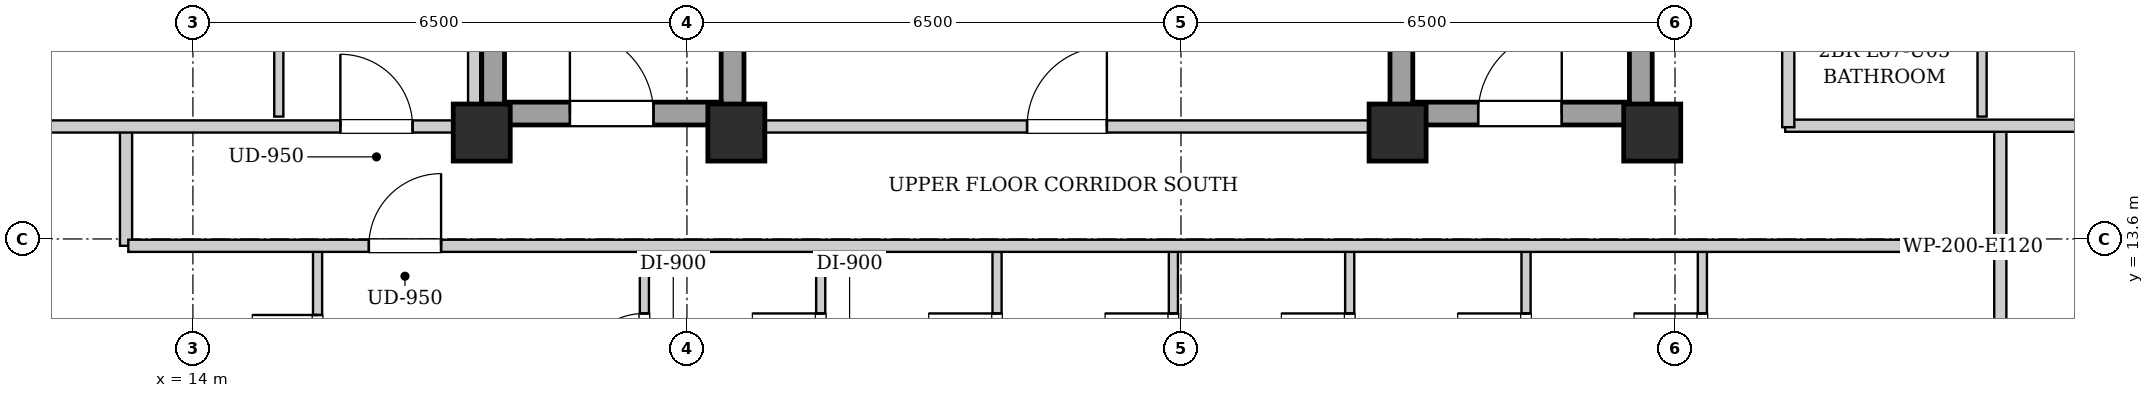
"""IFC4 building model, lengths in metres.
Left out: names, types, materials, properties, quantities, classifications, styles, units other than length and angle.
Written with IfcOpenShell. Run it as: python <this file> out.ifc"""

import sys

from ifc_helpers import new_model, si_unit, direction, frame, frame_2d, origin, origin_2d, place, context, subcontext, project, spatial, rectangle, extrude, element, fill, save


model = new_model("IFC4")
c1 = context("Model", 3, precision=1e-05, world=origin(), true_north=direction((0.0, 1.0)))
c2 = subcontext(c1, "Body", "Model", "MODEL_VIEW")
j1 = project(units=[si_unit("LENGTHUNIT", "METRE"), si_unit("PLANEANGLEUNIT", "RADIAN")], contexts=[c1])
p1 = place(None, origin())
s1 = spatial("IfcSite", under=j1, at=p1, CompositionType="ELEMENT")
p2 = place(p1, origin())
s2 = spatial("IfcBuilding", under=s1, at=p2, CompositionType="ELEMENT")
p3 = place(p2, frame((0.0, 0.0, 230.9)))
s3 = spatial("IfcBuildingStorey", under=s2, at=p3, CompositionType="ELEMENT", Elevation=230.9)
for number, where, z_axis, x_axis in (
    (1, (17.8, 15.0, 0.0), (0.0, 0.0, 1.0), (1.0, 0.0, 0.0)),
    (2, (21.15, 15.0, 0.0), (0.0, 0.0, 1.0), (1.0, 0.0, 0.0)),
    (3, (29.85, 15.0, 0.0), (0.0, 0.0, 1.0), (1.0, 0.0, 0.0)),
    (4, (33.2, 15.0, 0.0), (0.0, 0.0, 1.0), (1.0, 0.0, 0.0)),
):
    element("IfcColumn", number, at=place(p3, frame(where, z_axis=z_axis, x_axis=x_axis)), inside=s3, PredefinedType="COLUMN", context=c2, shape_type="SweptSolid", body=[
        extrude(rectangle(XDim=0.75, YDim=0.75, at=origin_2d()), origin(), (0.0, 0.0, 1.0), 3.4),
    ])
for number, where, z_axis, x_axis in (
    (5, (17.95, 15.1, 0.0), (0.0, 0.0, 1.0), (0.0, 1.0, 0.0)),
    (6, (21.1, 15.1, 0.0), (0.0, 0.0, 1.0), (0.0, 1.0, 0.0)),
):
    element("IfcWall", number, at=place(p3, frame(where, z_axis=z_axis, x_axis=x_axis)), inside=s3, PredefinedType="SHEAR", context=c2, shape_type="SweptSolid", body=[
        extrude(rectangle(XDim=9.0, YDim=0.3, at=frame_2d((4.5, 0.0))), origin(), (0.0, 0.0, 1.0), 3.14),
    ])
p4 = place(p3, frame((18.1, 15.25, 0.0), z_axis=(0.0, 0.0, 1.0), x_axis=(1.0, 0.0, 0.0)))
e7 = element("IfcWall", 7, at=p4, inside=s3, PredefinedType="SHEAR", context=c2, shape_type="SweptSolid", body=[
    extrude(rectangle(XDim=2.85, YDim=0.3, at=frame_2d((1.425, 0.0))), origin(), (0.0, 0.0, 1.0), 3.14),
])
p5 = place(p4, frame((0.86, 0.0, 0.0)))
e8 = element("IfcOpeningElement", 8, at=p5, cuts=e7, PredefinedType="OPENING", context=c2, shape_type="SweptSolid", body=[
    extrude(rectangle(XDim=1.1, YDim=2.05, at=frame_2d((0.55, 1.025))), frame((0.0, 0.16, 0.0), z_axis=(0.0, -1.0, 0.0), x_axis=(1.0, 0.0, 0.0)), (0.0, 0.0, 1.0), 0.32),
])
for number, where, z_axis, x_axis in (
    (9, (29.9, 15.1, 0.0), (0.0, 0.0, 1.0), (0.0, 1.0, 0.0)),
    (10, (33.05, 15.1, 0.0), (0.0, 0.0, 1.0), (0.0, 1.0, 0.0)),
):
    element("IfcWall", number, at=place(p3, frame(where, z_axis=z_axis, x_axis=x_axis)), inside=s3, PredefinedType="SHEAR", context=c2, shape_type="SweptSolid", body=[
        extrude(rectangle(XDim=9.0, YDim=0.3, at=frame_2d((4.5, 0.0))), origin(), (0.0, 0.0, 1.0), 3.14),
    ])
p6 = place(p3, frame((30.05, 15.25, 0.0), z_axis=(0.0, 0.0, 1.0), x_axis=(1.0, 0.0, 0.0)))
e11 = element("IfcWall", 11, at=p6, inside=s3, PredefinedType="SHEAR", context=c2, shape_type="SweptSolid", body=[
    extrude(rectangle(XDim=2.85, YDim=0.3, at=frame_2d((1.425, 0.0))), origin(), (0.0, 0.0, 1.0), 3.14),
])
p7 = place(p6, frame((0.86, 0.0, 0.0)))
e12 = element("IfcOpeningElement", 12, at=p7, cuts=e11, PredefinedType="OPENING", context=c2, shape_type="SweptSolid", body=[
    extrude(rectangle(XDim=1.1, YDim=2.05, at=frame_2d((0.55, 1.025))), frame((0.0, 0.16, 0.0), z_axis=(0.0, -1.0, 0.0), x_axis=(1.0, 0.0, 0.0)), (0.0, 0.0, 1.0), 0.32),
])
p8 = place(p3, frame((21.25, 15.08, 0.0), z_axis=(0.0, 0.0, 1.0), x_axis=(1.0, 0.0, 0.0)))
e13 = element("IfcWall", 13, at=p8, inside=s3, PredefinedType="PARTITIONING", context=c2, shape_type="SweptSolid", body=[
    extrude(rectangle(XDim=8.5, YDim=0.16, at=frame_2d((4.25, 0.0))), origin(), (0.0, 0.0, 1.0), 2.668),
])
p9 = place(p8, frame((3.725, 0.0, 0.0)))
e14 = element("IfcOpeningElement", 14, at=p9, cuts=e13, PredefinedType="OPENING", context=c2, shape_type="SweptSolid", body=[
    extrude(rectangle(XDim=1.05, YDim=2.05, at=frame_2d((0.525, 1.025))), frame((0.0, 0.09, 0.0), z_axis=(0.0, -1.0, 0.0), x_axis=(1.0, 0.0, 0.0)), (0.0, 0.0, 1.0), 0.18),
])
for number, where, z_axis, x_axis in (
    (15, (13.12, 13.51, 0.0), (0.0, 0.0, 1.0), (0.0, 1.0, 0.0)),
    (16, (37.78, 13.51, 0.0), (0.0, 0.0, 1.0), (0.0, 1.0, 0.0)),
):
    element("IfcWall", number, at=place(p3, frame(where, z_axis=z_axis, x_axis=x_axis)), inside=s3, PredefinedType="PARTITIONING", context=c2, shape_type="SweptSolid", body=[
        extrude(rectangle(XDim=1.58, YDim=0.16, at=frame_2d((0.79, 0.0))), origin(), (0.0, 0.0, 1.0), 3.14),
    ])
p10 = place(p3, frame((34.95, 15.09, 0.0), z_axis=(0.0, 0.0, 1.0), x_axis=(1.0, 0.0, 0.0)))
e17 = element("IfcWall", 17, at=p10, inside=s3, PredefinedType="PARTITIONING", context=c2, shape_type="SweptSolid", body=[
    extrude(rectangle(XDim=5.07, YDim=0.16, at=frame_2d((2.535, 0.0))), origin(), (0.0, 0.0, 1.0), 2.668),
])
p11 = place(p3, frame((37.78, 10.81, 0.0), z_axis=(0.0, 0.0, 1.0), x_axis=(0.0, 1.0, 0.0)))
e18 = element("IfcWall", 18, at=p11, inside=s3, PredefinedType="PARTITIONING", context=c2, shape_type="SweptSolid", body=[
    extrude(rectangle(XDim=2.66, YDim=0.16, at=frame_2d((1.33, 0.0))), origin(), (0.0, 0.0, 1.0), 3.14),
])
p12 = place(p3, frame((15.64, 10.87, 0.0), z_axis=(0.0, 0.0, 1.0), x_axis=(0.0, 1.0, 0.0)))
e19 = element("IfcWall", 19, at=p12, inside=s3, PredefinedType="PARTITIONING", context=c2, shape_type="SweptSolid", body=[
    extrude(rectangle(XDim=2.6, YDim=0.12, at=frame_2d((1.3, 0.0))), origin(), (0.0, 0.0, 1.0), 3.14),
])
p13 = place(p12, frame((0.87, 0.0, 0.0)))
e20 = element("IfcOpeningElement", 20, at=p13, cuts=e19, PredefinedType="OPENING", context=c2, shape_type="SweptSolid", body=[
    extrude(rectangle(XDim=0.86, YDim=2.05, at=frame_2d((0.43, 1.025))), frame((0.0, 0.07, 0.0), z_axis=(0.0, -1.0, 0.0), x_axis=(1.0, 0.0, 0.0)), (0.0, 0.0, 1.0), 0.14),
])
p14 = place(p3, frame((19.94, 10.87, 0.0), z_axis=(0.0, 0.0, 1.0), x_axis=(0.0, 1.0, 0.0)))
e21 = element("IfcWall", 21, at=p14, inside=s3, PredefinedType="PARTITIONING", context=c2, shape_type="SweptSolid", body=[
    extrude(rectangle(XDim=2.6, YDim=0.12, at=frame_2d((1.3, 0.0))), origin(), (0.0, 0.0, 1.0), 3.14),
])
p15 = place(p14, frame((0.85, 0.0, 0.0)))
e22 = element("IfcOpeningElement", 22, at=p15, cuts=e21, PredefinedType="OPENING", context=c2, shape_type="SweptSolid", body=[
    extrude(rectangle(XDim=0.9, YDim=2.05, at=frame_2d((0.45, 1.025))), frame((0.0, 0.07, 0.0), z_axis=(0.0, -1.0, 0.0), x_axis=(1.0, 0.0, 0.0)), (0.0, 0.0, 1.0), 0.14),
])
p16 = place(p3, frame((22.26, 10.87, 0.0), z_axis=(0.0, 0.0, 1.0), x_axis=(0.0, 1.0, 0.0)))
e23 = element("IfcWall", 23, at=p16, inside=s3, PredefinedType="PARTITIONING", context=c2, shape_type="SweptSolid", body=[
    extrude(rectangle(XDim=2.6, YDim=0.12, at=frame_2d((1.3, 0.0))), origin(), (0.0, 0.0, 1.0), 3.14),
])
p17 = place(p16, frame((0.85, 0.0, 0.0)))
e24 = element("IfcOpeningElement", 24, at=p17, cuts=e23, PredefinedType="OPENING", context=c2, shape_type="SweptSolid", body=[
    extrude(rectangle(XDim=0.9, YDim=2.05, at=frame_2d((0.45, 1.025))), frame((0.0, 0.07, 0.0), z_axis=(0.0, -1.0, 0.0), x_axis=(1.0, 0.0, 0.0)), (0.0, 0.0, 1.0), 0.14),
])
p18 = place(p3, frame((24.58, 10.87, 0.0), z_axis=(0.0, 0.0, 1.0), x_axis=(0.0, 1.0, 0.0)))
e25 = element("IfcWall", 25, at=p18, inside=s3, PredefinedType="PARTITIONING", context=c2, shape_type="SweptSolid", body=[
    extrude(rectangle(XDim=2.6, YDim=0.12, at=frame_2d((1.3, 0.0))), origin(), (0.0, 0.0, 1.0), 3.14),
])
p19 = place(p18, frame((0.85, 0.0, 0.0)))
e26 = element("IfcOpeningElement", 26, at=p19, cuts=e25, PredefinedType="OPENING", context=c2, shape_type="SweptSolid", body=[
    extrude(rectangle(XDim=0.9, YDim=2.05, at=frame_2d((0.45, 1.025))), frame((0.0, 0.07, 0.0), z_axis=(0.0, -1.0, 0.0), x_axis=(1.0, 0.0, 0.0)), (0.0, 0.0, 1.0), 0.14),
])
p20 = place(p3, frame((26.9, 10.87, 0.0), z_axis=(0.0, 0.0, 1.0), x_axis=(0.0, 1.0, 0.0)))
e27 = element("IfcWall", 27, at=p20, inside=s3, PredefinedType="PARTITIONING", context=c2, shape_type="SweptSolid", body=[
    extrude(rectangle(XDim=2.6, YDim=0.12, at=frame_2d((1.3, 0.0))), origin(), (0.0, 0.0, 1.0), 3.14),
])
p21 = place(p20, frame((0.85, 0.0, 0.0)))
e28 = element("IfcOpeningElement", 28, at=p21, cuts=e27, PredefinedType="OPENING", context=c2, shape_type="SweptSolid", body=[
    extrude(rectangle(XDim=0.9, YDim=2.05, at=frame_2d((0.45, 1.025))), frame((0.0, 0.07, 0.0), z_axis=(0.0, -1.0, 0.0), x_axis=(1.0, 0.0, 0.0)), (0.0, 0.0, 1.0), 0.14),
])
p22 = place(p3, frame((29.22, 10.87, 0.0), z_axis=(0.0, 0.0, 1.0), x_axis=(0.0, 1.0, 0.0)))
e29 = element("IfcWall", 29, at=p22, inside=s3, PredefinedType="PARTITIONING", context=c2, shape_type="SweptSolid", body=[
    extrude(rectangle(XDim=2.6, YDim=0.12, at=frame_2d((1.3, 0.0))), origin(), (0.0, 0.0, 1.0), 3.14),
])
p23 = place(p22, frame((0.85, 0.0, 0.0)))
e30 = element("IfcOpeningElement", 30, at=p23, cuts=e29, PredefinedType="OPENING", context=c2, shape_type="SweptSolid", body=[
    extrude(rectangle(XDim=0.9, YDim=2.05, at=frame_2d((0.45, 1.025))), frame((0.0, 0.07, 0.0), z_axis=(0.0, -1.0, 0.0), x_axis=(1.0, 0.0, 0.0)), (0.0, 0.0, 1.0), 0.14),
])
p24 = place(p3, frame((31.54, 10.87, 0.0), z_axis=(0.0, 0.0, 1.0), x_axis=(0.0, 1.0, 0.0)))
e31 = element("IfcWall", 31, at=p24, inside=s3, PredefinedType="PARTITIONING", context=c2, shape_type="SweptSolid", body=[
    extrude(rectangle(XDim=2.6, YDim=0.12, at=frame_2d((1.3, 0.0))), origin(), (0.0, 0.0, 1.0), 3.14),
])
p25 = place(p24, frame((0.85, 0.0, 0.0)))
e32 = element("IfcOpeningElement", 32, at=p25, cuts=e31, PredefinedType="OPENING", context=c2, shape_type="SweptSolid", body=[
    extrude(rectangle(XDim=0.9, YDim=2.05, at=frame_2d((0.45, 1.025))), frame((0.0, 0.07, 0.0), z_axis=(0.0, -1.0, 0.0), x_axis=(1.0, 0.0, 0.0)), (0.0, 0.0, 1.0), 0.14),
])
p26 = place(p3, frame((33.86, 10.87, 0.0), z_axis=(0.0, 0.0, 1.0), x_axis=(0.0, 1.0, 0.0)))
e33 = element("IfcWall", 33, at=p26, inside=s3, PredefinedType="PARTITIONING", context=c2, shape_type="SweptSolid", body=[
    extrude(rectangle(XDim=2.6, YDim=0.12, at=frame_2d((1.3, 0.0))), origin(), (0.0, 0.0, 1.0), 3.14),
])
p27 = place(p26, frame((0.85, 0.0, 0.0)))
e34 = element("IfcOpeningElement", 34, at=p27, cuts=e33, PredefinedType="OPENING", context=c2, shape_type="SweptSolid", body=[
    extrude(rectangle(XDim=0.9, YDim=2.05, at=frame_2d((0.45, 1.025))), frame((0.0, 0.07, 0.0), z_axis=(0.0, -1.0, 0.0), x_axis=(1.0, 0.0, 0.0)), (0.0, 0.0, 1.0), 0.14),
])
p28 = place(p3, frame((10.88, 15.08, 0.0), z_axis=(0.0, 0.0, 1.0), x_axis=(1.0, 0.0, 0.0)))
e35 = element("IfcWall", 35, at=p28, inside=s3, PredefinedType="PARTITIONING", context=c2, shape_type="SweptSolid", body=[
    extrude(rectangle(XDim=6.88, YDim=0.16, at=frame_2d((3.44, 0.0))), origin(), (0.0, 0.0, 1.0), 2.668),
])
p29 = place(p28, frame((5.06, 0.0, 0.0)))
e36 = element("IfcOpeningElement", 36, at=p29, cuts=e35, PredefinedType="OPENING", context=c2, shape_type="SweptSolid", body=[
    extrude(rectangle(XDim=0.95, YDim=2.1, at=frame_2d((0.475, 1.05))), frame((0.0, 0.09, 0.0), z_axis=(0.0, -1.0, 0.0), x_axis=(1.0, 0.0, 0.0)), (0.0, 0.0, 1.0), 0.18),
])
p30 = place(p3, frame((15.13, 15.21, 0.0), z_axis=(0.0, 0.0, 1.0), x_axis=(0.0, 1.0, 0.0)))
e37 = element("IfcWall", 37, at=p30, inside=s3, PredefinedType="PARTITIONING", context=c2, shape_type="SweptSolid", body=[
    extrude(rectangle(XDim=4.308, YDim=0.12, at=frame_2d((2.154, 0.0))), origin(), (0.0, 0.0, 1.0), 3.14),
])
p31 = place(p30, frame((1.704, 0.0, 0.0)))
e38 = element("IfcOpeningElement", 38, at=p31, cuts=e37, PredefinedType="OPENING", context=c2, shape_type="SweptSolid", body=[
    extrude(rectangle(XDim=0.9, YDim=2.05, at=frame_2d((0.45, 1.025))), frame((0.0, 0.07, 0.0), z_axis=(0.0, -1.0, 0.0), x_axis=(1.0, 0.0, 0.0)), (0.0, 0.0, 1.0), 0.14),
])
p32 = place(p3, frame((37.54, 15.21, 0.0), z_axis=(0.0, 0.0, 1.0), x_axis=(0.0, 1.0, 0.0)))
e39 = element("IfcWall", 39, at=p32, inside=s3, PredefinedType="PARTITIONING", context=c2, shape_type="SweptSolid", body=[
    extrude(rectangle(XDim=2.3, YDim=0.12, at=frame_2d((1.15, 0.0))), origin(), (0.0, 0.0, 1.0), 3.14),
])
p33 = place(p3, frame((13.15, 13.51, 0.0), z_axis=(0.0, 0.0, 1.0), x_axis=(1.0, 0.0, 0.0)))
e40 = element("IfcWall", 40, at=p33, inside=s3, PredefinedType="PARTITIONING", context=c2, shape_type="SweptSolid", body=[
    extrude(rectangle(XDim=24.6, YDim=0.16, at=frame_2d((12.3, 0.0))), origin(), (0.0, 0.0, 1.0), 3.14),
])
p34 = place(p33, frame((3.165, 0.0, 0.0)))
e41 = element("IfcOpeningElement", 41, at=p34, cuts=e40, PredefinedType="OPENING", context=c2, shape_type="SweptSolid", body=[
    extrude(rectangle(XDim=0.95, YDim=2.1, at=frame_2d((0.475, 1.05))), frame((0.0, 0.09, 0.0), z_axis=(0.0, -1.0, 0.0), x_axis=(1.0, 0.0, 0.0)), (0.0, 0.0, 1.0), 0.18),
])
p35 = place(p3, frame((17.7, 15.02, 0.0), z_axis=(0.0, 0.0, 1.0), x_axis=(0.0, 1.0, 0.0)))
e42 = element("IfcWall", 42, at=p35, inside=s3, PredefinedType="PARTITIONING", context=c2, shape_type="SweptSolid", body=[
    extrude(rectangle(XDim=13.98, YDim=0.16, at=frame_2d((6.99, 0.0))), origin(), (0.0, 0.0, 1.0), 3.14),
])
p36 = place(p3, frame((34.99, 15.07, 0.0), z_axis=(0.0, 0.0, 1.0), x_axis=(0.0, 1.0, 0.0)))
e43 = element("IfcWall", 43, at=p36, inside=s3, PredefinedType="PARTITIONING", context=c2, shape_type="SweptSolid", body=[
    extrude(rectangle(XDim=13.93, YDim=0.16, at=frame_2d((6.965, 0.0))), origin(), (0.0, 0.0, 1.0), 3.14),
])
p37 = place(p36, frame((4.385, 0.0, 0.0)))
e44 = element("IfcOpeningElement", 44, at=p37, cuts=e43, PredefinedType="OPENING", context=c2, shape_type="SweptSolid", body=[
    extrude(rectangle(XDim=0.95, YDim=2.1, at=frame_2d((0.475, 1.05))), frame((0.0, 0.09, 0.0), z_axis=(0.0, -1.0, 0.0), x_axis=(1.0, 0.0, 0.0)), (0.0, 0.0, 1.0), 0.18),
])
p38 = place(p5, origin())
e45 = element("IfcDoor", 45, at=p38, inside=s3, OperationType="SINGLE_SWING_LEFT", PredefinedType="DOOR", context=c2, shape_type="SweptSolid", body=[
    extrude(rectangle(XDim=1.1, YDim=2.05, at=frame_2d((0.55, 1.025))), frame((0.0, 0.025, 0.0), z_axis=(0.0, -1.0, 0.0), x_axis=(1.0, 0.0, 0.0)), (0.0, 0.0, 1.0), 0.05),
])
fill(e8, e45)
p39 = place(p7, origin())
e46 = element("IfcDoor", 46, at=p39, inside=s3, OperationType="SINGLE_SWING_RIGHT", PredefinedType="DOOR", context=c2, shape_type="SweptSolid", body=[
    extrude(rectangle(XDim=1.1, YDim=2.05, at=frame_2d((0.55, 1.025))), frame((0.0, 0.025, 0.0), z_axis=(0.0, -1.0, 0.0), x_axis=(1.0, 0.0, 0.0)), (0.0, 0.0, 1.0), 0.05),
])
fill(e12, e46)
p40 = place(p9, origin())
e47 = element("IfcDoor", 47, at=p40, inside=s3, OperationType="SINGLE_SWING_RIGHT", PredefinedType="DOOR", context=c2, shape_type="SweptSolid", body=[
    extrude(rectangle(XDim=1.05, YDim=2.05, at=frame_2d((0.525, 1.025))), frame((0.0, 0.025, 0.0), z_axis=(0.0, -1.0, 0.0), x_axis=(1.0, 0.0, 0.0)), (0.0, 0.0, 1.0), 0.05),
])
fill(e14, e47)
p41 = place(p13, origin())
e48 = element("IfcDoor", 48, at=p41, inside=s3, OperationType="SINGLE_SWING_RIGHT", PredefinedType="DOOR", context=c2, shape_type="SweptSolid", body=[
    extrude(rectangle(XDim=0.86, YDim=2.05, at=frame_2d((0.43, 1.025))), frame((0.0, 0.025, 0.0), z_axis=(0.0, -1.0, 0.0), x_axis=(1.0, 0.0, 0.0)), (0.0, 0.0, 1.0), 0.05),
])
fill(e20, e48)
p42 = place(p15, origin())
e49 = element("IfcDoor", 49, at=p42, inside=s3, OperationType="SINGLE_SWING_LEFT", PredefinedType="DOOR", context=c2, shape_type="SweptSolid", body=[
    extrude(rectangle(XDim=0.9, YDim=2.05, at=frame_2d((0.45, 1.025))), frame((0.0, 0.025, 0.0), z_axis=(0.0, -1.0, 0.0), x_axis=(1.0, 0.0, 0.0)), (0.0, 0.0, 1.0), 0.05),
])
fill(e22, e49)
p43 = place(p17, origin())
e50 = element("IfcDoor", 50, at=p43, inside=s3, OperationType="SINGLE_SWING_RIGHT", PredefinedType="DOOR", context=c2, shape_type="SweptSolid", body=[
    extrude(rectangle(XDim=0.9, YDim=2.05, at=frame_2d((0.45, 1.025))), frame((0.0, 0.025, 0.0), z_axis=(0.0, -1.0, 0.0), x_axis=(1.0, 0.0, 0.0)), (0.0, 0.0, 1.0), 0.05),
])
fill(e24, e50)
p44 = place(p19, origin())
e51 = element("IfcDoor", 51, at=p44, inside=s3, OperationType="SINGLE_SWING_RIGHT", PredefinedType="DOOR", context=c2, shape_type="SweptSolid", body=[
    extrude(rectangle(XDim=0.9, YDim=2.05, at=frame_2d((0.45, 1.025))), frame((0.0, 0.025, 0.0), z_axis=(0.0, -1.0, 0.0), x_axis=(1.0, 0.0, 0.0)), (0.0, 0.0, 1.0), 0.05),
])
fill(e26, e51)
p45 = place(p21, origin())
e52 = element("IfcDoor", 52, at=p45, inside=s3, OperationType="SINGLE_SWING_RIGHT", PredefinedType="DOOR", context=c2, shape_type="SweptSolid", body=[
    extrude(rectangle(XDim=0.9, YDim=2.05, at=frame_2d((0.45, 1.025))), frame((0.0, 0.025, 0.0), z_axis=(0.0, -1.0, 0.0), x_axis=(1.0, 0.0, 0.0)), (0.0, 0.0, 1.0), 0.05),
])
fill(e28, e52)
p46 = place(p23, origin())
e53 = element("IfcDoor", 53, at=p46, inside=s3, OperationType="SINGLE_SWING_RIGHT", PredefinedType="DOOR", context=c2, shape_type="SweptSolid", body=[
    extrude(rectangle(XDim=0.9, YDim=2.05, at=frame_2d((0.45, 1.025))), frame((0.0, 0.025, 0.0), z_axis=(0.0, -1.0, 0.0), x_axis=(1.0, 0.0, 0.0)), (0.0, 0.0, 1.0), 0.05),
])
fill(e30, e53)
p47 = place(p25, origin())
e54 = element("IfcDoor", 54, at=p47, inside=s3, OperationType="SINGLE_SWING_RIGHT", PredefinedType="DOOR", context=c2, shape_type="SweptSolid", body=[
    extrude(rectangle(XDim=0.9, YDim=2.05, at=frame_2d((0.45, 1.025))), frame((0.0, 0.025, 0.0), z_axis=(0.0, -1.0, 0.0), x_axis=(1.0, 0.0, 0.0)), (0.0, 0.0, 1.0), 0.05),
])
fill(e32, e54)
p48 = place(p27, origin())
e55 = element("IfcDoor", 55, at=p48, inside=s3, OperationType="SINGLE_SWING_RIGHT", PredefinedType="DOOR", context=c2, shape_type="SweptSolid", body=[
    extrude(rectangle(XDim=0.9, YDim=2.05, at=frame_2d((0.45, 1.025))), frame((0.0, 0.025, 0.0), z_axis=(0.0, -1.0, 0.0), x_axis=(1.0, 0.0, 0.0)), (0.0, 0.0, 1.0), 0.05),
])
fill(e34, e55)
p49 = place(p29, origin())
e56 = element("IfcDoor", 56, at=p49, inside=s3, OperationType="SINGLE_SWING_LEFT", PredefinedType="DOOR", context=c2, shape_type="SweptSolid", body=[
    extrude(rectangle(XDim=0.95, YDim=2.1, at=frame_2d((0.475, 1.05))), frame((0.0, 0.025, 0.0), z_axis=(0.0, -1.0, 0.0), x_axis=(1.0, 0.0, 0.0)), (0.0, 0.0, 1.0), 0.05),
])
fill(e36, e56)
p50 = place(p34, origin())
e57 = element("IfcDoor", 57, at=p50, inside=s3, OperationType="SINGLE_SWING_RIGHT", PredefinedType="DOOR", context=c2, shape_type="SweptSolid", body=[
    extrude(rectangle(XDim=0.95, YDim=2.1, at=frame_2d((0.475, 1.05))), frame((0.0, 0.025, 0.0), z_axis=(0.0, -1.0, 0.0), x_axis=(1.0, 0.0, 0.0)), (0.0, 0.0, 1.0), 0.05),
])
fill(e41, e57)
save(model, sys.argv[1])
